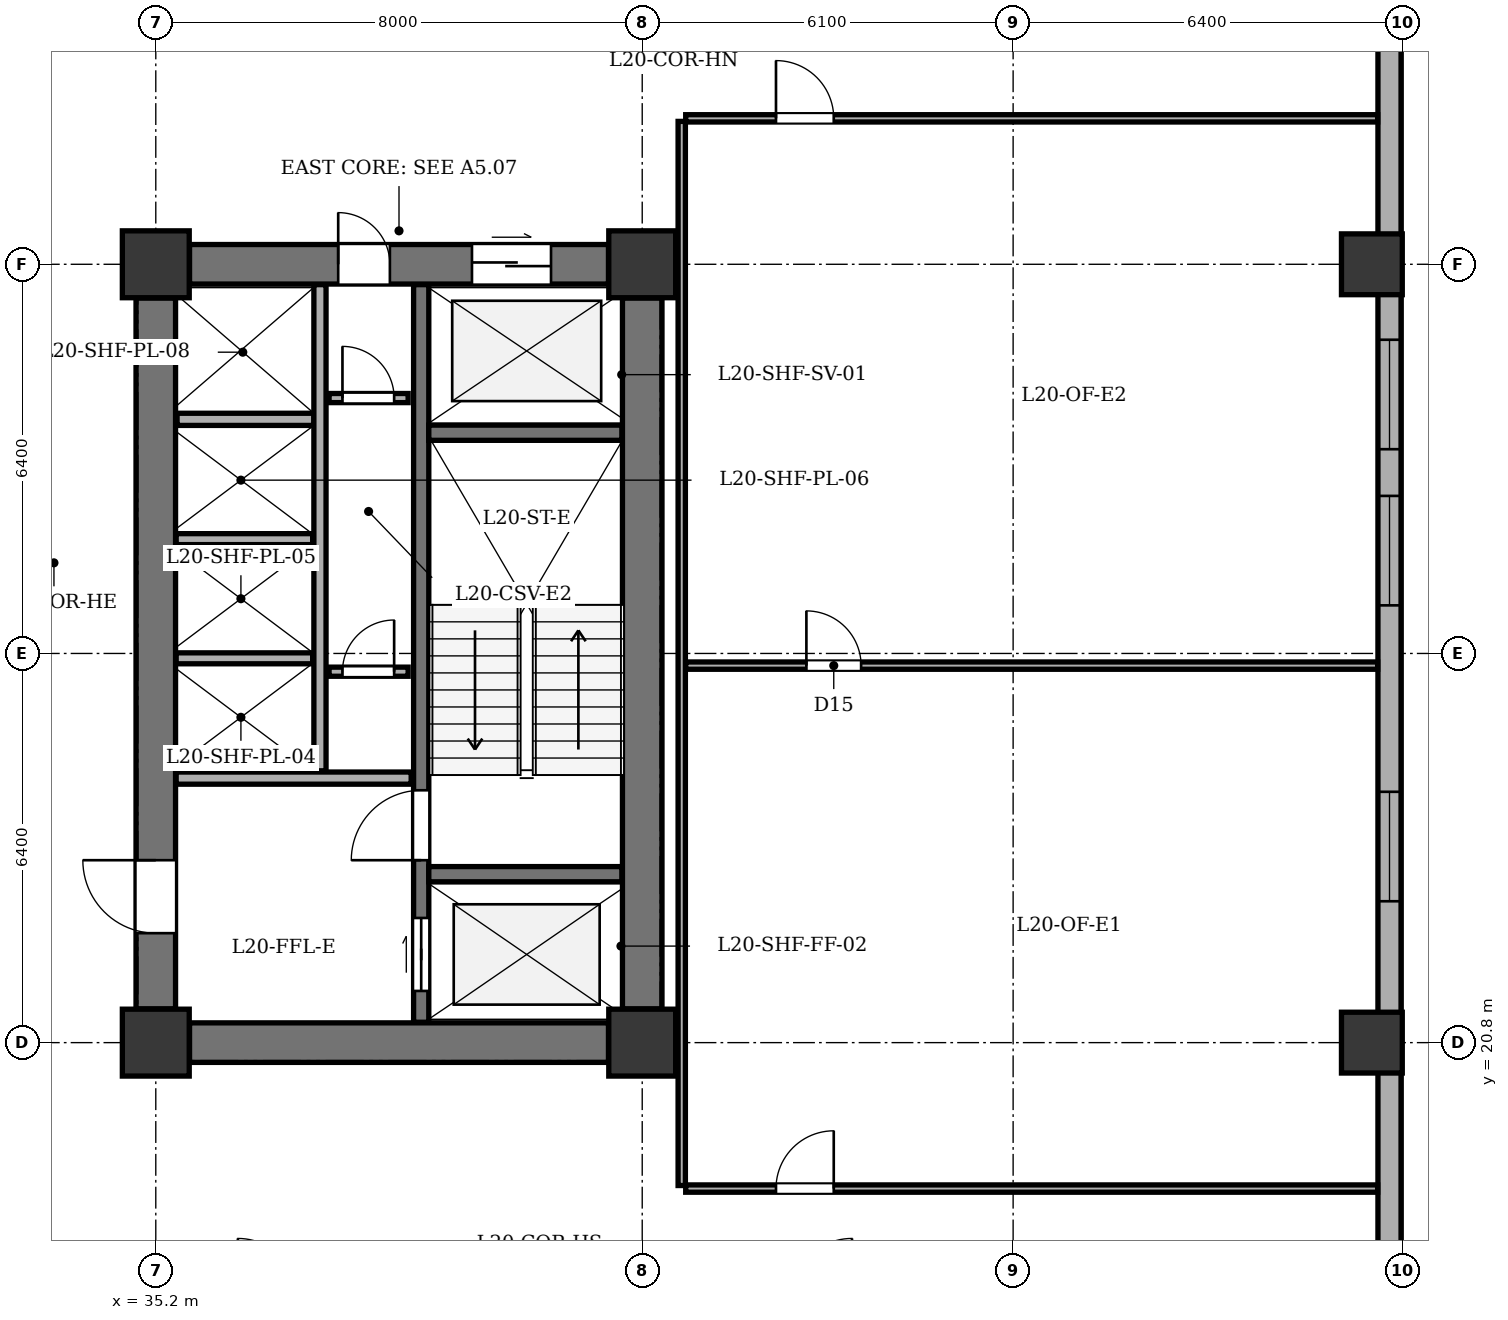
"""IFC4 building model, lengths in metres.
Left out: names, types, materials, properties, quantities, classifications, styles, units other than length and angle.
Written with IfcOpenShell. Run it as: python <this file> out.ifc"""

import sys

from ifc_helpers import new_model, si_unit, direction, frame, frame_2d, origin, origin_2d, place, context, subcontext, project, spatial, rectangle, extrude, element, fill, save


model = new_model("IFC4")
c1 = context("Model", 3, precision=1e-05, world=origin(), true_north=direction((0.0, 1.0)))
c2 = subcontext(c1, "Body", "Model", "MODEL_VIEW")
j1 = project(units=[si_unit("LENGTHUNIT", "METRE"), si_unit("PLANEANGLEUNIT", "RADIAN")], contexts=[c1])
p1 = place(None, origin())
s1 = spatial("IfcSite", under=j1, at=p1, CompositionType="ELEMENT")
p2 = place(p1, origin())
s2 = spatial("IfcBuilding", under=s1, at=p2, CompositionType="ELEMENT")
p3 = place(p2, frame((0.0, 0.0, 82.8)))
s3 = spatial("IfcBuildingStorey", under=s2, at=p3, CompositionType="ELEMENT", Elevation=82.8)
for number, where, z_axis, x_axis in (
    (1, (35.2, 20.8, 0.0), (0.0, 0.0, 1.0), (1.0, 0.0, 0.0)),
    (2, (43.2, 20.8, 0.0), (0.0, 0.0, 1.0), (1.0, 0.0, 0.0)),
    (3, (35.2, 33.6, 0.0), (0.0, 0.0, 1.0), (1.0, 0.0, 0.0)),
    (4, (43.2, 33.6, 0.0), (0.0, 0.0, 1.0), (1.0, 0.0, 0.0)),
):
    element("IfcColumn", number, at=place(p3, frame(where, z_axis=z_axis, x_axis=x_axis)), inside=s3, PredefinedType="COLUMN", context=c2, shape_type="SweptSolid", body=[
        extrude(rectangle(XDim=1.1, YDim=1.1, at=origin_2d()), origin(), (0.0, 0.0, 1.0), 3.9),
    ])
for number, where, z_axis, x_axis in (
    (5, (55.2, 20.8, 0.0), (0.0, 0.0, 1.0), (1.0, 0.0, 0.0)),
    (6, (55.2, 33.6, 0.0), (0.0, 0.0, 1.0), (1.0, 0.0, 0.0)),
):
    element("IfcColumn", number, at=place(p3, frame(where, z_axis=z_axis, x_axis=x_axis)), inside=s3, PredefinedType="COLUMN", context=c2, shape_type="SweptSolid", body=[
        extrude(rectangle(XDim=1.0, YDim=1.0, at=origin_2d()), origin(), (0.0, 0.0, 1.0), 3.9),
    ])
p4 = place(p3, frame((55.49, 47.9, 0.0), z_axis=(0.0, 0.0, 1.0), x_axis=(0.0, -1.0, 0.0)))
e7 = element("IfcWall", 7, at=p4, inside=s3, PredefinedType="STANDARD", context=c2, shape_type="SweptSolid", body=[
    extrude(rectangle(XDim=35.0, YDim=0.38, at=frame_2d((17.5, 0.0))), origin(), (0.0, 0.0, 1.0), 3.135),
])
p5 = place(p4, frame((2.693, 0.0, 0.8)))
e8 = element("IfcOpeningElement", 8, at=p5, cuts=e7, PredefinedType="OPENING", context=c2, shape_type="SweptSolid", body=[
    extrude(rectangle(XDim=1.8, YDim=1.9, at=frame_2d((0.9, 0.95))), frame((0.0, 0.2, 0.0), z_axis=(0.0, -1.0, 0.0), x_axis=(1.0, 0.0, 0.0)), (0.0, 0.0, 1.0), 0.4),
])
p6 = place(p4, frame((7.457, 0.0, 0.8)))
e9 = element("IfcOpeningElement", 9, at=p6, cuts=e7, PredefinedType="OPENING", context=c2, shape_type="SweptSolid", body=[
    extrude(rectangle(XDim=2.4, YDim=1.9, at=frame_2d((1.2, 0.95))), frame((0.0, 0.2, 0.0), z_axis=(0.0, -1.0, 0.0), x_axis=(1.0, 0.0, 0.0)), (0.0, 0.0, 1.0), 0.4),
])
p7 = place(p4, frame((15.541, 0.0, 0.8)))
e10 = element("IfcOpeningElement", 10, at=p7, cuts=e7, PredefinedType="OPENING", context=c2, shape_type="SweptSolid", body=[
    extrude(rectangle(XDim=1.8, YDim=1.9, at=frame_2d((0.9, 0.95))), frame((0.0, 0.2, 0.0), z_axis=(0.0, -1.0, 0.0), x_axis=(1.0, 0.0, 0.0)), (0.0, 0.0, 1.0), 0.4),
])
p8 = place(p4, frame((18.109, 0.0, 0.8)))
e11 = element("IfcOpeningElement", 11, at=p8, cuts=e7, PredefinedType="OPENING", context=c2, shape_type="SweptSolid", body=[
    extrude(rectangle(XDim=1.8, YDim=1.9, at=frame_2d((0.9, 0.95))), frame((0.0, 0.2, 0.0), z_axis=(0.0, -1.0, 0.0), x_axis=(1.0, 0.0, 0.0)), (0.0, 0.0, 1.0), 0.4),
])
p9 = place(p4, frame((22.975, 0.0, 0.8)))
e12 = element("IfcOpeningElement", 12, at=p9, cuts=e7, PredefinedType="OPENING", context=c2, shape_type="SweptSolid", body=[
    extrude(rectangle(XDim=1.8, YDim=1.9, at=frame_2d((0.9, 0.95))), frame((0.0, 0.2, 0.0), z_axis=(0.0, -1.0, 0.0), x_axis=(1.0, 0.0, 0.0)), (0.0, 0.0, 1.0), 0.4),
])
p10 = place(p4, frame((31.175, 0.0, 0.8)))
e13 = element("IfcOpeningElement", 13, at=p10, cuts=e7, PredefinedType="OPENING", context=c2, shape_type="SweptSolid", body=[
    extrude(rectangle(XDim=1.8, YDim=1.9, at=frame_2d((0.9, 0.95))), frame((0.0, 0.2, 0.0), z_axis=(0.0, -1.0, 0.0), x_axis=(1.0, 0.0, 0.0)), (0.0, 0.0, 1.0), 0.4),
])
p11 = place(p3, frame((43.2, 21.355, 0.0), z_axis=(0.0, 0.0, 1.0), x_axis=(0.0, 1.0, 0.0)))
e14 = element("IfcWall", 14, at=p11, inside=s3, PredefinedType="SHEAR", context=c2, shape_type="SweptSolid", body=[
    extrude(rectangle(XDim=11.69, YDim=0.65, at=frame_2d((5.845, 0.0))), origin(), (0.0, 0.0, 1.0), 3.6),
])
p12 = place(p3, frame((35.755, 20.8, 0.0), z_axis=(0.0, 0.0, 1.0), x_axis=(1.0, 0.0, 0.0)))
e15 = element("IfcWall", 15, at=p12, inside=s3, PredefinedType="SHEAR", context=c2, shape_type="SweptSolid", body=[
    extrude(rectangle(XDim=6.89, YDim=0.65, at=frame_2d((3.445, 0.0))), origin(), (0.0, 0.0, 1.0), 3.6),
])
p13 = place(p3, frame((35.755, 33.6, 0.0), z_axis=(0.0, 0.0, 1.0), x_axis=(1.0, 0.0, 0.0)))
e16 = element("IfcWall", 16, at=p13, inside=s3, PredefinedType="SHEAR", context=c2, shape_type="SweptSolid", body=[
    extrude(rectangle(XDim=6.89, YDim=0.65, at=frame_2d((3.445, 0.0))), origin(), (0.0, 0.0, 1.0), 3.6),
])
p14 = place(p13, frame((4.645, 0.0, 0.0)))
e17 = element("IfcOpeningElement", 17, at=p14, cuts=e16, PredefinedType="OPENING", context=c2, shape_type="SweptSolid", body=[
    extrude(rectangle(XDim=1.3, YDim=2.15, at=frame_2d((0.65, 1.075))), frame((0.0, 0.335, 0.0), z_axis=(0.0, -1.0, 0.0), x_axis=(1.0, 0.0, 0.0)), (0.0, 0.0, 1.0), 0.67),
])
p15 = place(p13, frame((2.445, 0.0, 0.0)))
e18 = element("IfcOpeningElement", 18, at=p15, cuts=e16, PredefinedType="OPENING", context=c2, shape_type="SweptSolid", body=[
    extrude(rectangle(XDim=0.85, YDim=2.02, at=frame_2d((0.425, 1.01))), frame((0.0, 0.335, 0.0), z_axis=(0.0, -1.0, 0.0), x_axis=(1.0, 0.0, 0.0)), (0.0, 0.0, 1.0), 0.67),
])
p16 = place(p3, frame((35.2, 21.355, 0.0), z_axis=(0.0, 0.0, 1.0), x_axis=(0.0, 1.0, 0.0)))
e19 = element("IfcWall", 19, at=p16, inside=s3, PredefinedType="SHEAR", context=c2, shape_type="SweptSolid", body=[
    extrude(rectangle(XDim=11.69, YDim=0.65, at=frame_2d((5.845, 0.0))), origin(), (0.0, 0.0, 1.0), 3.6),
])
p17 = place(p16, frame((1.245, 0.0, 0.0)))
e20 = element("IfcOpeningElement", 20, at=p17, cuts=e19, PredefinedType="OPENING", context=c2, shape_type="SweptSolid", body=[
    extrude(rectangle(XDim=1.2, YDim=2.15, at=frame_2d((0.6, 1.075))), frame((0.0, 0.335, 0.0), z_axis=(0.0, -1.0, 0.0), x_axis=(1.0, 0.0, 0.0)), (0.0, 0.0, 1.0), 0.67),
])
p18 = place(p3, frame((39.565, 21.135, 0.0), z_axis=(0.0, 0.0, 1.0), x_axis=(0.0, 1.0, 0.0)))
e21 = element("IfcWall", 21, at=p18, inside=s3, PredefinedType="SHEAR", context=c2, shape_type="SweptSolid", body=[
    extrude(rectangle(XDim=12.13, YDim=0.25, at=frame_2d((6.065, 0.0))), origin(), (0.0, 0.0, 1.0), 3.6),
])
p19 = place(p18, frame((0.515, 0.0, 0.0)))
e22 = element("IfcOpeningElement", 22, at=p19, cuts=e21, PredefinedType="OPENING", context=c2, shape_type="SweptSolid", body=[
    extrude(rectangle(XDim=1.2, YDim=2.15, at=frame_2d((0.6, 1.075))), frame((0.0, 0.135, 0.0), z_axis=(0.0, -1.0, 0.0), x_axis=(1.0, 0.0, 0.0)), (0.0, 0.0, 1.0), 0.27),
])
p20 = place(p18, frame((2.665, 0.0, 0.0)))
e23 = element("IfcOpeningElement", 23, at=p20, cuts=e21, PredefinedType="OPENING", context=c2, shape_type="SweptSolid", body=[
    extrude(rectangle(XDim=1.15, YDim=2.15, at=frame_2d((0.575, 1.075))), frame((0.0, 0.135, 0.0), z_axis=(0.0, -1.0, 0.0), x_axis=(1.0, 0.0, 0.0)), (0.0, 0.0, 1.0), 0.27),
])
for number, where, z_axis, x_axis in (
    (24, (39.69, 23.57, 0.0), (0.0, 0.0, 1.0), (1.0, 0.0, 0.0)),
    (25, (39.69, 30.83, 0.0), (0.0, 0.0, 1.0), (1.0, 0.0, 0.0)),
):
    element("IfcWall", number, at=place(p3, frame(where, z_axis=z_axis, x_axis=x_axis)), inside=s3, PredefinedType="SHEAR", context=c2, shape_type="SweptSolid", body=[
        extrude(rectangle(XDim=3.175, YDim=0.25, at=frame_2d((1.587, 0.0))), origin(), (0.0, 0.0, 1.0), 3.6),
    ])
p21 = place(p3, frame((35.535, 25.15, 0.0), z_axis=(0.0, 0.0, 1.0), x_axis=(1.0, 0.0, 0.0)))
e26 = element("IfcWall", 26, at=p21, inside=s3, PredefinedType="SOLIDWALL", context=c2, shape_type="SweptSolid", body=[
    extrude(rectangle(XDim=3.865, YDim=0.2, at=frame_2d((1.933, 0.0))), origin(), (0.0, 0.0, 1.0), 3.6),
])
p22 = place(p3, frame((35.55, 31.05, 0.0), z_axis=(0.0, 0.0, 1.0), x_axis=(1.0, 0.0, 0.0)))
e27 = element("IfcWall", 27, at=p22, inside=s3, PredefinedType="SOLIDWALL", context=c2, shape_type="SweptSolid", body=[
    extrude(rectangle(XDim=2.25, YDim=0.2, at=frame_2d((1.125, 0.0))), origin(), (0.0, 0.0, 1.0), 3.6),
])
p23 = place(p3, frame((37.9, 25.27, 0.0), z_axis=(0.0, 0.0, 1.0), x_axis=(0.0, 1.0, 0.0)))
e28 = element("IfcWall", 28, at=p23, inside=s3, PredefinedType="SOLIDWALL", context=c2, shape_type="SweptSolid", body=[
    extrude(rectangle(XDim=7.995, YDim=0.2, at=frame_2d((3.998, 0.0))), origin(), (0.0, 0.0, 1.0), 3.6),
])
for number, where, z_axis, x_axis in (
    (29, (35.535, 27.12, 0.0), (0.0, 0.0, 1.0), (1.0, 0.0, 0.0)),
    (30, (35.535, 29.08, 0.0), (0.0, 0.0, 1.0), (1.0, 0.0, 0.0)),
):
    element("IfcWall", number, at=place(p3, frame(where, z_axis=z_axis, x_axis=x_axis)), inside=s3, PredefinedType="PARTITIONING", context=c2, shape_type="SweptSolid", body=[
        extrude(rectangle(XDim=2.245, YDim=0.18, at=frame_2d((1.123, 0.0))), origin(), (0.0, 0.0, 1.0), 3.6),
    ])
p24 = place(p3, frame((38.05, 26.9, 0.0), z_axis=(0.0, 0.0, 1.0), x_axis=(1.0, 0.0, 0.0)))
e31 = element("IfcWall", 31, at=p24, inside=s3, PredefinedType="PARTITIONING", context=c2, shape_type="SweptSolid", body=[
    extrude(rectangle(XDim=1.3, YDim=0.15, at=frame_2d((0.65, 0.0))), origin(), (0.0, 0.0, 1.0), 3.6),
])
p25 = place(p24, frame((0.22, 0.0, 0.0)))
e32 = element("IfcOpeningElement", 32, at=p25, cuts=e31, PredefinedType="OPENING", context=c2, shape_type="SweptSolid", body=[
    extrude(rectangle(XDim=0.85, YDim=2.02, at=frame_2d((0.425, 1.01))), frame((0.0, 0.085, 0.0), z_axis=(0.0, -1.0, 0.0), x_axis=(1.0, 0.0, 0.0)), (0.0, 0.0, 1.0), 0.17),
])
p26 = place(p3, frame((38.05, 31.4, 0.0), z_axis=(0.0, 0.0, 1.0), x_axis=(1.0, 0.0, 0.0)))
e33 = element("IfcWall", 33, at=p26, inside=s3, PredefinedType="PARTITIONING", context=c2, shape_type="SweptSolid", body=[
    extrude(rectangle(XDim=1.3, YDim=0.15, at=frame_2d((0.65, 0.0))), origin(), (0.0, 0.0, 1.0), 3.6),
])
p27 = place(p26, frame((0.22, 0.0, 0.0)))
e34 = element("IfcOpeningElement", 34, at=p27, cuts=e33, PredefinedType="OPENING", context=c2, shape_type="SweptSolid", body=[
    extrude(rectangle(XDim=0.85, YDim=2.02, at=frame_2d((0.425, 1.01))), frame((0.0, 0.085, 0.0), z_axis=(0.0, -1.0, 0.0), x_axis=(1.0, 0.0, 0.0)), (0.0, 0.0, 1.0), 0.17),
])
p28 = place(p3, frame((43.85, 18.45, 0.0), z_axis=(0.0, 0.0, 1.0), x_axis=(0.0, 1.0, 0.0)))
e35 = element("IfcWall", 35, at=p28, inside=s3, PredefinedType="PARTITIONING", context=c2, shape_type="SweptSolid", body=[
    extrude(rectangle(XDim=17.5, YDim=0.12, at=frame_2d((8.75, 0.0))), origin(), (0.0, 0.0, 1.0), 3.6),
])
p29 = place(p3, frame((43.915, 18.4, 0.0), z_axis=(0.0, 0.0, 1.0), x_axis=(1.0, 0.0, 0.0)))
e36 = element("IfcWall", 36, at=p29, inside=s3, PredefinedType="PARTITIONING", context=c2, shape_type="SweptSolid", body=[
    extrude(rectangle(XDim=11.38, YDim=0.12, at=frame_2d((5.69, 0.0))), origin(), (0.0, 0.0, 1.0), 3.6),
])
p30 = place(p29, frame((1.485, 0.0, 0.0)))
e37 = element("IfcOpeningElement", 37, at=p30, cuts=e36, PredefinedType="OPENING", context=c2, shape_type="SweptSolid", body=[
    extrude(rectangle(XDim=0.95, YDim=2.1, at=frame_2d((0.475, 1.05))), frame((0.0, 0.07, 0.0), z_axis=(0.0, -1.0, 0.0), x_axis=(1.0, 0.0, 0.0)), (0.0, 0.0, 1.0), 0.14),
])
p31 = place(p3, frame((43.915, 36.0, 0.0), z_axis=(0.0, 0.0, 1.0), x_axis=(1.0, 0.0, 0.0)))
e38 = element("IfcWall", 38, at=p31, inside=s3, PredefinedType="PARTITIONING", context=c2, shape_type="SweptSolid", body=[
    extrude(rectangle(XDim=11.38, YDim=0.12, at=frame_2d((5.69, 0.0))), origin(), (0.0, 0.0, 1.0), 3.6),
])
p32 = place(p31, frame((1.485, 0.0, 0.0)))
e39 = element("IfcOpeningElement", 39, at=p32, cuts=e38, PredefinedType="OPENING", context=c2, shape_type="SweptSolid", body=[
    extrude(rectangle(XDim=0.95, YDim=2.1, at=frame_2d((0.475, 1.05))), frame((0.0, 0.07, 0.0), z_axis=(0.0, -1.0, 0.0), x_axis=(1.0, 0.0, 0.0)), (0.0, 0.0, 1.0), 0.14),
])
p33 = place(p3, frame((43.915, 27.0, 0.0), z_axis=(0.0, 0.0, 1.0), x_axis=(1.0, 0.0, 0.0)))
e40 = element("IfcWall", 40, at=p33, inside=s3, PredefinedType="PARTITIONING", context=c2, shape_type="SweptSolid", body=[
    extrude(rectangle(XDim=11.38, YDim=0.12, at=frame_2d((5.69, 0.0))), origin(), (0.0, 0.0, 1.0), 3.6),
])
p34 = place(p33, frame((1.985, 0.0, 0.0)))
e41 = element("IfcOpeningElement", 41, at=p34, cuts=e40, PredefinedType="OPENING", context=c2, shape_type="SweptSolid", body=[
    extrude(rectangle(XDim=0.9, YDim=2.05, at=frame_2d((0.45, 1.025))), frame((0.0, 0.07, 0.0), z_axis=(0.0, -1.0, 0.0), x_axis=(1.0, 0.0, 0.0)), (0.0, 0.0, 1.0), 0.14),
])
p35 = place(p7, origin())
e42 = element("IfcWindow", 42, at=p35, inside=s3, PartitioningType="SINGLE_PANEL", PredefinedType="WINDOW", context=c2, shape_type="SweptSolid", body=[
    extrude(rectangle(XDim=1.8, YDim=1.9, at=frame_2d((0.9, 0.95))), frame((0.0, -0.01, 0.0), z_axis=(0.0, -1.0, 0.0), x_axis=(1.0, 0.0, 0.0)), (0.0, 0.0, 1.0), 0.06),
])
fill(e10, e42)
p36 = place(p8, origin())
e43 = element("IfcWindow", 43, at=p36, inside=s3, PartitioningType="SINGLE_PANEL", PredefinedType="WINDOW", context=c2, shape_type="SweptSolid", body=[
    extrude(rectangle(XDim=1.8, YDim=1.9, at=frame_2d((0.9, 0.95))), frame((0.0, -0.01, 0.0), z_axis=(0.0, -1.0, 0.0), x_axis=(1.0, 0.0, 0.0)), (0.0, 0.0, 1.0), 0.06),
])
fill(e11, e43)
p37 = place(p9, origin())
e44 = element("IfcWindow", 44, at=p37, inside=s3, PartitioningType="SINGLE_PANEL", PredefinedType="WINDOW", context=c2, shape_type="SweptSolid", body=[
    extrude(rectangle(XDim=1.8, YDim=1.9, at=frame_2d((0.9, 0.95))), frame((0.0, -0.01, 0.0), z_axis=(0.0, -1.0, 0.0), x_axis=(1.0, 0.0, 0.0)), (0.0, 0.0, 1.0), 0.06),
])
fill(e12, e44)
p38 = place(p14, origin())
e45 = element("IfcDoor", 45, at=p38, inside=s3, OperationType="DOUBLE_DOOR_SLIDING", PredefinedType="DOOR", context=c2, shape_type="SweptSolid", body=[
    extrude(rectangle(XDim=1.3, YDim=2.15, at=frame_2d((0.65, 1.075))), frame((0.0, 0.025, 0.0), z_axis=(0.0, -1.0, 0.0), x_axis=(1.0, 0.0, 0.0)), (0.0, 0.0, 1.0), 0.05),
])
fill(e17, e45)
p39 = place(p15, origin())
e46 = element("IfcDoor", 46, at=p39, inside=s3, OperationType="SINGLE_SWING_LEFT", PredefinedType="DOOR", context=c2, shape_type="SweptSolid", body=[
    extrude(rectangle(XDim=0.85, YDim=2.02, at=frame_2d((0.425, 1.01))), frame((0.0, 0.025, 0.0), z_axis=(0.0, -1.0, 0.0), x_axis=(1.0, 0.0, 0.0)), (0.0, 0.0, 1.0), 0.05),
])
fill(e18, e46)
p40 = place(p17, origin())
e47 = element("IfcDoor", 47, at=p40, inside=s3, OperationType="SINGLE_SWING_RIGHT", PredefinedType="DOOR", context=c2, shape_type="SweptSolid", body=[
    extrude(rectangle(XDim=1.2, YDim=2.15, at=frame_2d((0.6, 1.075))), frame((0.0, 0.025, 0.0), z_axis=(0.0, -1.0, 0.0), x_axis=(1.0, 0.0, 0.0)), (0.0, 0.0, 1.0), 0.05),
])
fill(e20, e47)
p41 = place(p19, origin())
e48 = element("IfcDoor", 48, at=p41, inside=s3, OperationType="DOUBLE_DOOR_SLIDING", PredefinedType="DOOR", context=c2, shape_type="SweptSolid", body=[
    extrude(rectangle(XDim=1.2, YDim=2.15, at=frame_2d((0.6, 1.075))), frame((0.0, 0.025, 0.0), z_axis=(0.0, -1.0, 0.0), x_axis=(1.0, 0.0, 0.0)), (0.0, 0.0, 1.0), 0.05),
])
fill(e22, e48)
p42 = place(p20, origin())
e49 = element("IfcDoor", 49, at=p42, inside=s3, OperationType="SINGLE_SWING_LEFT", PredefinedType="DOOR", context=c2, shape_type="SweptSolid", body=[
    extrude(rectangle(XDim=1.15, YDim=2.15, at=frame_2d((0.575, 1.075))), frame((0.0, 0.025, 0.0), z_axis=(0.0, -1.0, 0.0), x_axis=(1.0, 0.0, 0.0)), (0.0, 0.0, 1.0), 0.05),
])
fill(e23, e49)
p43 = place(p25, origin())
e50 = element("IfcDoor", 50, at=p43, inside=s3, OperationType="SINGLE_SWING_RIGHT", PredefinedType="DOOR", context=c2, shape_type="SweptSolid", body=[
    extrude(rectangle(XDim=0.85, YDim=2.02, at=frame_2d((0.425, 1.01))), frame((0.0, 0.025, 0.0), z_axis=(0.0, -1.0, 0.0), x_axis=(1.0, 0.0, 0.0)), (0.0, 0.0, 1.0), 0.05),
])
fill(e32, e50)
p44 = place(p27, origin())
e51 = element("IfcDoor", 51, at=p44, inside=s3, OperationType="SINGLE_SWING_LEFT", PredefinedType="DOOR", context=c2, shape_type="SweptSolid", body=[
    extrude(rectangle(XDim=0.85, YDim=2.02, at=frame_2d((0.425, 1.01))), frame((0.0, 0.025, 0.0), z_axis=(0.0, -1.0, 0.0), x_axis=(1.0, 0.0, 0.0)), (0.0, 0.0, 1.0), 0.05),
])
fill(e34, e51)
p45 = place(p34, origin())
e52 = element("IfcDoor", 52, at=p45, inside=s3, OperationType="SINGLE_SWING_LEFT", PredefinedType="DOOR", context=c2, shape_type="SweptSolid", body=[
    extrude(rectangle(XDim=0.9, YDim=2.05, at=frame_2d((0.45, 1.025))), frame((0.0, 0.025, 0.0), z_axis=(0.0, -1.0, 0.0), x_axis=(1.0, 0.0, 0.0)), (0.0, 0.0, 1.0), 0.05),
])
fill(e41, e52)
p46 = place(p30, origin())
e53 = element("IfcDoor", 53, at=p46, inside=s3, OperationType="SINGLE_SWING_RIGHT", PredefinedType="DOOR", context=c2, shape_type="SweptSolid", body=[
    extrude(rectangle(XDim=0.95, YDim=2.1, at=frame_2d((0.475, 1.05))), frame((0.0, 0.025, 0.0), z_axis=(0.0, -1.0, 0.0), x_axis=(1.0, 0.0, 0.0)), (0.0, 0.0, 1.0), 0.05),
])
fill(e37, e53)
p47 = place(p32, origin())
e54 = element("IfcDoor", 54, at=p47, inside=s3, OperationType="SINGLE_SWING_LEFT", PredefinedType="DOOR", context=c2, shape_type="SweptSolid", body=[
    extrude(rectangle(XDim=0.95, YDim=2.1, at=frame_2d((0.475, 1.05))), frame((0.0, 0.025, 0.0), z_axis=(0.0, -1.0, 0.0), x_axis=(1.0, 0.0, 0.0)), (0.0, 0.0, 1.0), 0.05),
])
fill(e39, e54)
save(model, sys.argv[1])
